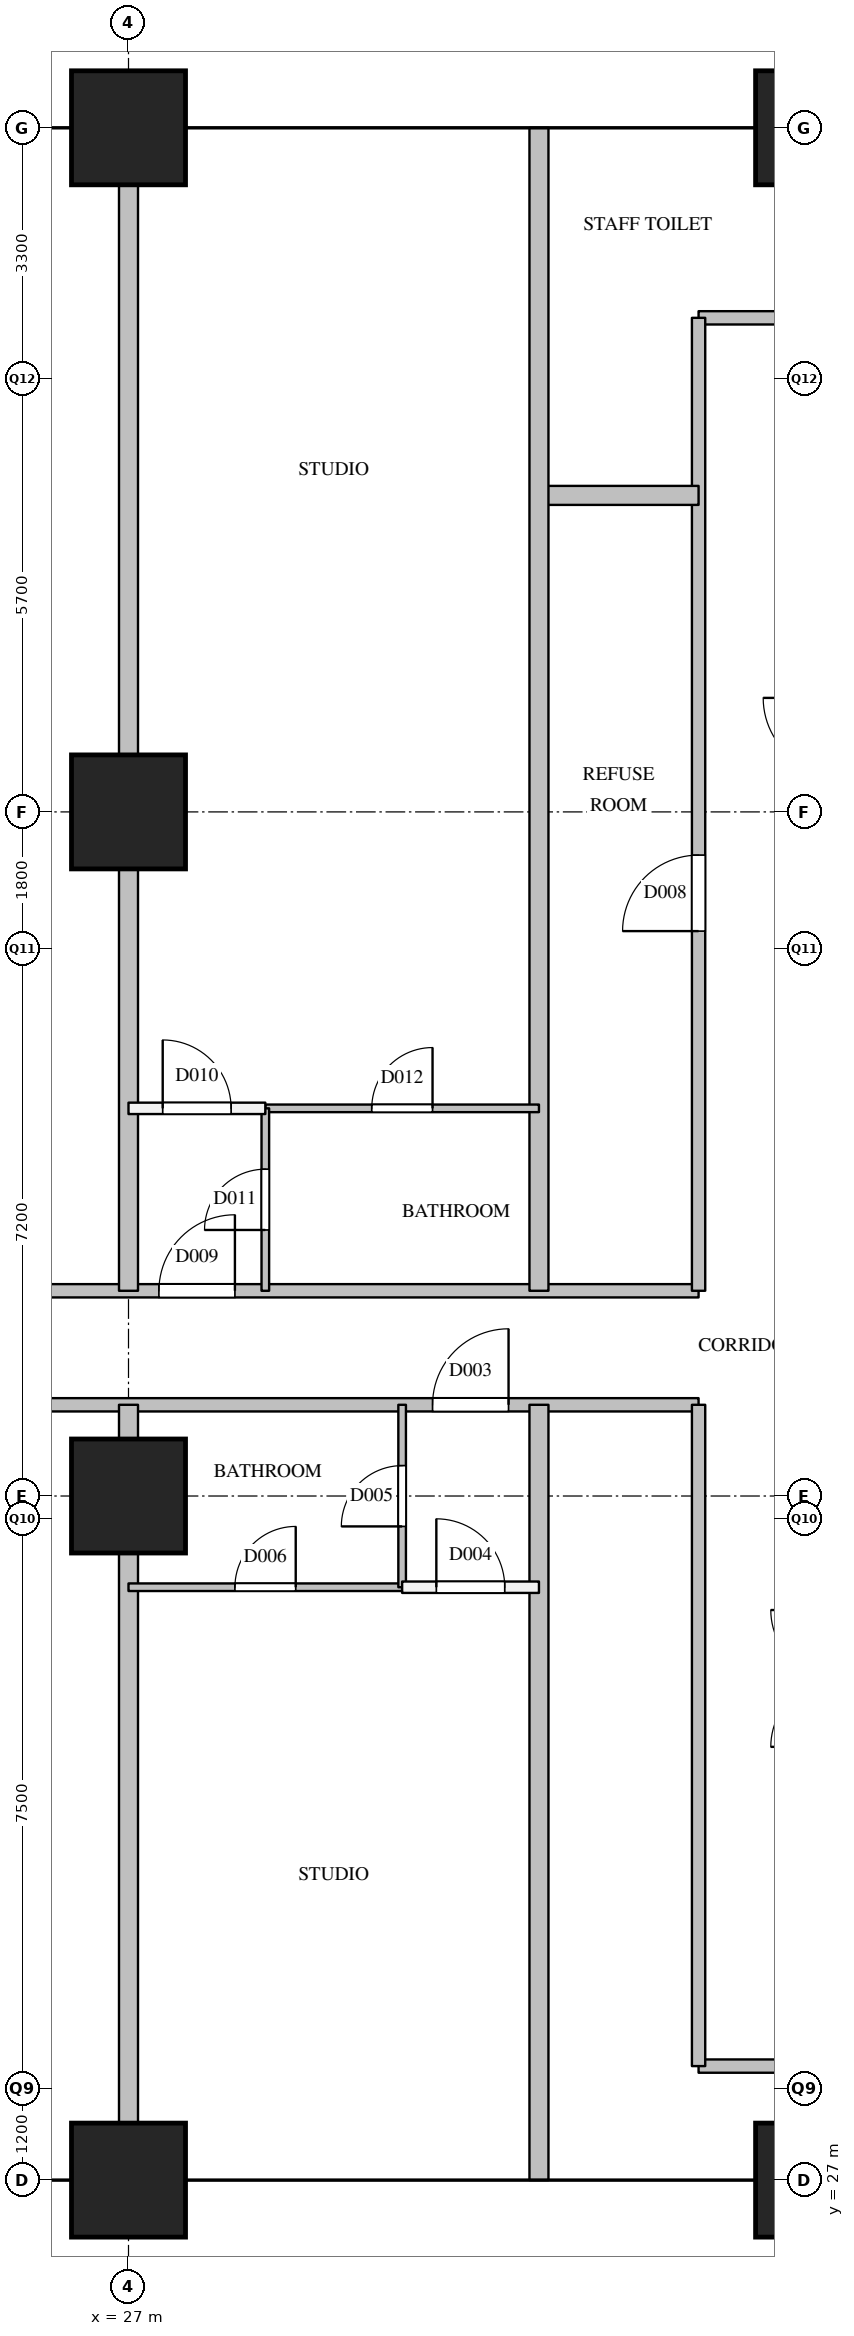
"""IFC4 building model, lengths in metres.
Left out: names, types, materials, properties, quantities, classifications, styles, units other than length and angle.
Written with IfcOpenShell. Run it as: python <this file> out.ifc"""

import sys

from ifc_helpers import new_model, si_unit, direction, frame, frame_2d, origin, origin_2d, place, context, subcontext, project, spatial, rectangle, extrude, element, fill, save


model = new_model("IFC4")
c1 = context("Model", 3, precision=1e-05, world=origin(), true_north=direction((0.0, 1.0)))
c2 = subcontext(c1, "Body", "Model", "MODEL_VIEW")
j1 = project(units=[si_unit("LENGTHUNIT", "METRE"), si_unit("PLANEANGLEUNIT", "RADIAN")], contexts=[c1])
p1 = place(None, origin())
s1 = spatial("IfcSite", under=j1, at=p1, CompositionType="ELEMENT")
p2 = place(p1, origin())
s2 = spatial("IfcBuilding", under=s1, at=p2, CompositionType="ELEMENT")
p3 = place(p2, frame((0.0, 0.0, 189.5)))
s3 = spatial("IfcBuildingStorey", under=s2, at=p3, CompositionType="ELEMENT", Elevation=189.5)
for number, where, z_axis, x_axis in (
    (1, (27.0, 27.0, 0.0), (0.0, 0.0, 1.0), (1.0, 0.0, 0.0)),
    (2, (27.0, 36.0, 0.0), (0.0, 0.0, 1.0), (1.0, 0.0, 0.0)),
    (3, (27.0, 45.0, 0.0), (0.0, 0.0, 1.0), (1.0, 0.0, 0.0)),
    (4, (27.0, 54.0, 0.0), (0.0, 0.0, 1.0), (1.0, 0.0, 0.0)),
    (5, (36.0, 27.0, 0.0), (0.0, 0.0, 1.0), (1.0, 0.0, 0.0)),
    (6, (36.0, 54.0, 0.0), (0.0, 0.0, 1.0), (1.0, 0.0, 0.0)),
):
    element("IfcColumn", number, at=place(p3, frame(where, z_axis=z_axis, x_axis=x_axis)), inside=s3, PredefinedType="COLUMN", context=c2, shape_type="SweptSolid", body=[
        extrude(rectangle(XDim=1.5, YDim=1.5, at=origin_2d()), origin(), (0.0, 0.0, 1.0), 3.9),
    ])
p4 = place(p3, frame((34.5, 28.5, 0.0), z_axis=(0.0, 0.0, 1.0), x_axis=(1.0, 0.0, 0.0)))
e7 = element("IfcWall", 7, at=p4, inside=s3, PredefinedType="PARTITIONING", context=c2, shape_type="SweptSolid", body=[
    extrude(rectangle(XDim=1.5, YDim=0.175, at=frame_2d((0.75, 0.0))), origin(), (0.0, 0.0, 1.0), 3.6),
])
p5 = place(p3, frame((19.5, 37.2, 0.0), z_axis=(0.0, 0.0, 1.0), x_axis=(1.0, 0.0, 0.0)))
e8 = element("IfcWall", 8, at=p5, inside=s3, PredefinedType="PARTITIONING", context=c2, shape_type="SweptSolid", body=[
    extrude(rectangle(XDim=15.0, YDim=0.175, at=frame_2d((7.5, 0.0))), origin(), (0.0, 0.0, 1.0), 2.6),
])
p6 = place(p5, frame((11.5, 0.0, 0.0)))
e9 = element("IfcOpeningElement", 9, at=p6, cuts=e8, PredefinedType="OPENING", context=c2, shape_type="SweptSolid", body=[
    extrude(rectangle(XDim=1.0, YDim=2.1, at=frame_2d((0.5, 1.05))), frame((0.0, 0.097, 0.0), z_axis=(0.0, -1.0, 0.0), x_axis=(1.0, 0.0, 0.0)), (0.0, 0.0, 1.0), 0.195),
])
p7 = place(p3, frame((19.5, 38.7, 0.0), z_axis=(0.0, 0.0, 1.0), x_axis=(1.0, 0.0, 0.0)))
e10 = element("IfcWall", 10, at=p7, inside=s3, PredefinedType="PARTITIONING", context=c2, shape_type="SweptSolid", body=[
    extrude(rectangle(XDim=15.0, YDim=0.175, at=frame_2d((7.5, 0.0))), origin(), (0.0, 0.0, 1.0), 2.6),
])
p8 = place(p7, frame((7.9, 0.0, 0.0)))
e11 = element("IfcOpeningElement", 11, at=p8, cuts=e10, PredefinedType="OPENING", context=c2, shape_type="SweptSolid", body=[
    extrude(rectangle(XDim=1.0, YDim=2.1, at=frame_2d((0.5, 1.05))), frame((0.0, 0.097, 0.0), z_axis=(0.0, -1.0, 0.0), x_axis=(1.0, 0.0, 0.0)), (0.0, 0.0, 1.0), 0.195),
])
p9 = place(p3, frame((34.5, 51.5, 0.0), z_axis=(0.0, 0.0, 1.0), x_axis=(1.0, 0.0, 0.0)))
e12 = element("IfcWall", 12, at=p9, inside=s3, PredefinedType="PARTITIONING", context=c2, shape_type="SweptSolid", body=[
    extrude(rectangle(XDim=15.4, YDim=0.175, at=frame_2d((7.7, 0.0))), origin(), (0.0, 0.0, 1.0), 3.6),
])
p10 = place(p9, frame((4.542, 0.0, 0.0)))
e13 = element("IfcOpeningElement", 13, at=p10, cuts=e12, PredefinedType="OPENING", context=c2, shape_type="SweptSolid", body=[
    extrude(rectangle(XDim=1.0, YDim=2.1, at=frame_2d((0.5, 1.05))), frame((0.0, 0.097, 0.0), z_axis=(0.0, -1.0, 0.0), x_axis=(1.0, 0.0, 0.0)), (0.0, 0.0, 1.0), 0.195),
])
p11 = place(p3, frame((34.5, 28.5, 0.0), z_axis=(0.0, 0.0, 1.0), x_axis=(0.0, 1.0, 0.0)))
e14 = element("IfcWall", 14, at=p11, inside=s3, PredefinedType="PARTITIONING", context=c2, shape_type="SweptSolid", body=[
    extrude(rectangle(XDim=8.7, YDim=0.175, at=frame_2d((4.35, 0.0))), origin(), (0.0, 0.0, 1.0), 3.6),
])
p12 = place(p3, frame((34.5, 38.7, 0.0), z_axis=(0.0, 0.0, 1.0), x_axis=(0.0, 1.0, 0.0)))
e15 = element("IfcWall", 15, at=p12, inside=s3, PredefinedType="PARTITIONING", context=c2, shape_type="SweptSolid", body=[
    extrude(rectangle(XDim=12.8, YDim=0.175, at=frame_2d((6.4, 0.0))), origin(), (0.0, 0.0, 1.0), 3.6),
])
p13 = place(p12, frame((4.732, 0.0, 0.0)))
e16 = element("IfcOpeningElement", 16, at=p13, cuts=e15, PredefinedType="OPENING", context=c2, shape_type="SweptSolid", body=[
    extrude(rectangle(XDim=1.0, YDim=2.1, at=frame_2d((0.5, 1.05))), frame((0.0, 0.097, 0.0), z_axis=(0.0, -1.0, 0.0), x_axis=(1.0, 0.0, 0.0)), (0.0, 0.0, 1.0), 0.195),
])
p14 = place(p3, frame((30.6, 34.8, 0.0), z_axis=(0.0, 0.0, 1.0), x_axis=(1.0, 0.0, 0.0)))
e17 = element("IfcWall", 17, at=p14, inside=s3, PredefinedType="PARTITIONING", context=c2, shape_type="SweptSolid", body=[
    extrude(rectangle(XDim=1.8, YDim=0.15, at=frame_2d((0.9, 0.0))), origin(), (0.0, 0.0, 1.0), 3.6),
])
p15 = place(p14, frame((0.45, 0.0, 0.0)))
e18 = element("IfcOpeningElement", 18, at=p15, cuts=e17, PredefinedType="OPENING", context=c2, shape_type="SweptSolid", body=[
    extrude(rectangle(XDim=0.9, YDim=2.1, at=frame_2d((0.45, 1.05))), frame((0.0, 0.085, 0.0), z_axis=(0.0, -1.0, 0.0), x_axis=(1.0, 0.0, 0.0)), (0.0, 0.0, 1.0), 0.17),
])
p16 = place(p3, frame((27.0, 41.1, 0.0), z_axis=(0.0, 0.0, 1.0), x_axis=(1.0, 0.0, 0.0)))
e19 = element("IfcWall", 19, at=p16, inside=s3, PredefinedType="PARTITIONING", context=c2, shape_type="SweptSolid", body=[
    extrude(rectangle(XDim=1.8, YDim=0.15, at=frame_2d((0.9, 0.0))), origin(), (0.0, 0.0, 1.0), 2.6),
])
p17 = place(p16, frame((0.45, 0.0, 0.0)))
e20 = element("IfcOpeningElement", 20, at=p17, cuts=e19, PredefinedType="OPENING", context=c2, shape_type="SweptSolid", body=[
    extrude(rectangle(XDim=0.9, YDim=2.1, at=frame_2d((0.45, 1.05))), frame((0.0, 0.085, 0.0), z_axis=(0.0, -1.0, 0.0), x_axis=(1.0, 0.0, 0.0)), (0.0, 0.0, 1.0), 0.17),
])
p18 = place(p3, frame((32.4, 49.164, 0.0), z_axis=(0.0, 0.0, 1.0), x_axis=(1.0, 0.0, 0.0)))
e21 = element("IfcWall", 21, at=p18, inside=s3, PredefinedType="PARTITIONING", context=c2, shape_type="SweptSolid", body=[
    extrude(rectangle(XDim=2.1, YDim=0.25, at=frame_2d((1.05, 0.0))), origin(), (0.0, 0.0, 1.0), 3.6),
])
p19 = place(p3, frame((27.0, 27.0, 0.0), z_axis=(0.0, 0.0, 1.0), x_axis=(0.0, 1.0, 0.0)))
e22 = element("IfcWall", 22, at=p19, inside=s3, PredefinedType="PARTITIONING", context=c2, shape_type="SweptSolid", body=[
    extrude(rectangle(XDim=10.2, YDim=0.25, at=frame_2d((5.1, 0.0))), origin(), (0.0, 0.0, 1.0), 2.6),
])
p20 = place(p3, frame((27.0, 38.7, 0.0), z_axis=(0.0, 0.0, 1.0), x_axis=(0.0, 1.0, 0.0)))
e23 = element("IfcWall", 23, at=p20, inside=s3, PredefinedType="PARTITIONING", context=c2, shape_type="SweptSolid", body=[
    extrude(rectangle(XDim=15.3, YDim=0.25, at=frame_2d((7.65, 0.0))), origin(), (0.0, 0.0, 1.0), 2.6),
])
p21 = place(p3, frame((32.4, 27.0, 0.0), z_axis=(0.0, 0.0, 1.0), x_axis=(0.0, 1.0, 0.0)))
e24 = element("IfcWall", 24, at=p21, inside=s3, PredefinedType="PARTITIONING", context=c2, shape_type="SweptSolid", body=[
    extrude(rectangle(XDim=10.2, YDim=0.25, at=frame_2d((5.1, 0.0))), origin(), (0.0, 0.0, 1.0), 2.6),
])
p22 = place(p3, frame((32.4, 38.7, 0.0), z_axis=(0.0, 0.0, 1.0), x_axis=(0.0, 1.0, 0.0)))
e25 = element("IfcWall", 25, at=p22, inside=s3, PredefinedType="PARTITIONING", context=c2, shape_type="SweptSolid", body=[
    extrude(rectangle(XDim=15.3, YDim=0.25, at=frame_2d((7.65, 0.0))), origin(), (0.0, 0.0, 1.0), 2.6),
])
p23 = place(p3, frame((27.0, 34.8, 0.0), z_axis=(0.0, 0.0, 1.0), x_axis=(1.0, 0.0, 0.0)))
e26 = element("IfcWall", 26, at=p23, inside=s3, PredefinedType="PARTITIONING", context=c2, shape_type="SweptSolid", body=[
    extrude(rectangle(XDim=3.6, YDim=0.1, at=frame_2d((1.8, 0.0))), origin(), (0.0, 0.0, 1.0), 2.6),
])
p24 = place(p23, frame((1.4, 0.0, 0.0)))
e27 = element("IfcOpeningElement", 27, at=p24, cuts=e26, PredefinedType="OPENING", context=c2, shape_type="SweptSolid", body=[
    extrude(rectangle(XDim=0.8, YDim=2.1, at=frame_2d((0.4, 1.05))), frame((0.0, 0.06, 0.0), z_axis=(0.0, -1.0, 0.0), x_axis=(1.0, 0.0, 0.0)), (0.0, 0.0, 1.0), 0.12),
])
p25 = place(p3, frame((28.8, 41.1, 0.0), z_axis=(0.0, 0.0, 1.0), x_axis=(1.0, 0.0, 0.0)))
e28 = element("IfcWall", 28, at=p25, inside=s3, PredefinedType="PARTITIONING", context=c2, shape_type="SweptSolid", body=[
    extrude(rectangle(XDim=3.6, YDim=0.1, at=frame_2d((1.8, 0.0))), origin(), (0.0, 0.0, 1.0), 3.6),
])
p26 = place(p25, frame((1.4, 0.0, 0.0)))
e29 = element("IfcOpeningElement", 29, at=p26, cuts=e28, PredefinedType="OPENING", context=c2, shape_type="SweptSolid", body=[
    extrude(rectangle(XDim=0.8, YDim=2.1, at=frame_2d((0.4, 1.05))), frame((0.0, 0.06, 0.0), z_axis=(0.0, -1.0, 0.0), x_axis=(1.0, 0.0, 0.0)), (0.0, 0.0, 1.0), 0.12),
])
p27 = place(p3, frame((28.8, 38.7, 0.0), z_axis=(0.0, 0.0, 1.0), x_axis=(0.0, 1.0, 0.0)))
e30 = element("IfcWall", 30, at=p27, inside=s3, PredefinedType="PARTITIONING", context=c2, shape_type="SweptSolid", body=[
    extrude(rectangle(XDim=2.4, YDim=0.1, at=frame_2d((1.2, 0.0))), origin(), (0.0, 0.0, 1.0), 3.6),
])
p28 = place(p27, frame((0.8, 0.0, 0.0)))
e31 = element("IfcOpeningElement", 31, at=p28, cuts=e30, PredefinedType="OPENING", context=c2, shape_type="SweptSolid", body=[
    extrude(rectangle(XDim=0.8, YDim=2.1, at=frame_2d((0.4, 1.05))), frame((0.0, 0.06, 0.0), z_axis=(0.0, -1.0, 0.0), x_axis=(1.0, 0.0, 0.0)), (0.0, 0.0, 1.0), 0.12),
])
p29 = place(p3, frame((30.6, 34.8, 0.0), z_axis=(0.0, 0.0, 1.0), x_axis=(0.0, 1.0, 0.0)))
e32 = element("IfcWall", 32, at=p29, inside=s3, PredefinedType="PARTITIONING", context=c2, shape_type="SweptSolid", body=[
    extrude(rectangle(XDim=2.4, YDim=0.1, at=frame_2d((1.2, 0.0))), origin(), (0.0, 0.0, 1.0), 3.6),
])
p30 = place(p29, frame((0.8, 0.0, 0.0)))
e33 = element("IfcOpeningElement", 33, at=p30, cuts=e32, PredefinedType="OPENING", context=c2, shape_type="SweptSolid", body=[
    extrude(rectangle(XDim=0.8, YDim=2.1, at=frame_2d((0.4, 1.05))), frame((0.0, 0.06, 0.0), z_axis=(0.0, -1.0, 0.0), x_axis=(1.0, 0.0, 0.0)), (0.0, 0.0, 1.0), 0.12),
])
p31 = place(p6, origin())
e34 = element("IfcDoor", 34, at=p31, inside=s3, OperationType="SINGLE_SWING_RIGHT", PredefinedType="DOOR", context=c2, shape_type="SweptSolid", body=[
    extrude(rectangle(XDim=1.0, YDim=2.1, at=frame_2d((0.5, 1.05))), frame((0.0, 0.025, 0.0), z_axis=(0.0, -1.0, 0.0), x_axis=(1.0, 0.0, 0.0)), (0.0, 0.0, 1.0), 0.05),
])
fill(e9, e34)
p32 = place(p15, origin())
e35 = element("IfcDoor", 35, at=p32, inside=s3, OperationType="SINGLE_SWING_LEFT", PredefinedType="DOOR", context=c2, shape_type="SweptSolid", body=[
    extrude(rectangle(XDim=0.9, YDim=2.1, at=frame_2d((0.45, 1.05))), frame((0.0, 0.025, 0.0), z_axis=(0.0, -1.0, 0.0), x_axis=(1.0, 0.0, 0.0)), (0.0, 0.0, 1.0), 0.05),
])
fill(e18, e35)
p33 = place(p30, origin())
e36 = element("IfcDoor", 36, at=p33, inside=s3, OperationType="SINGLE_SWING_LEFT", PredefinedType="DOOR", context=c2, shape_type="SweptSolid", body=[
    extrude(rectangle(XDim=0.8, YDim=2.1, at=frame_2d((0.4, 1.05))), frame((0.0, 0.025, 0.0), z_axis=(0.0, -1.0, 0.0), x_axis=(1.0, 0.0, 0.0)), (0.0, 0.0, 1.0), 0.05),
])
fill(e33, e36)
p34 = place(p24, origin())
e37 = element("IfcDoor", 37, at=p34, inside=s3, OperationType="SINGLE_SWING_RIGHT", PredefinedType="DOOR", context=c2, shape_type="SweptSolid", body=[
    extrude(rectangle(XDim=0.8, YDim=2.1, at=frame_2d((0.4, 1.05))), frame((0.0, 0.025, 0.0), z_axis=(0.0, -1.0, 0.0), x_axis=(1.0, 0.0, 0.0)), (0.0, 0.0, 1.0), 0.05),
])
fill(e27, e37)
p35 = place(p13, origin())
e38 = element("IfcDoor", 38, at=p35, inside=s3, OperationType="SINGLE_SWING_LEFT", PredefinedType="DOOR", context=c2, shape_type="SweptSolid", body=[
    extrude(rectangle(XDim=1.0, YDim=2.1, at=frame_2d((0.5, 1.05))), frame((0.0, 0.025, 0.0), z_axis=(0.0, -1.0, 0.0), x_axis=(1.0, 0.0, 0.0)), (0.0, 0.0, 1.0), 0.05),
])
fill(e16, e38)
p36 = place(p8, origin())
e39 = element("IfcDoor", 39, at=p36, inside=s3, OperationType="SINGLE_SWING_RIGHT", PredefinedType="DOOR", context=c2, shape_type="SweptSolid", body=[
    extrude(rectangle(XDim=1.0, YDim=2.1, at=frame_2d((0.5, 1.05))), frame((0.0, 0.025, 0.0), z_axis=(0.0, -1.0, 0.0), x_axis=(1.0, 0.0, 0.0)), (0.0, 0.0, 1.0), 0.05),
])
fill(e11, e39)
p37 = place(p17, origin())
e40 = element("IfcDoor", 40, at=p37, inside=s3, OperationType="SINGLE_SWING_LEFT", PredefinedType="DOOR", context=c2, shape_type="SweptSolid", body=[
    extrude(rectangle(XDim=0.9, YDim=2.1, at=frame_2d((0.45, 1.05))), frame((0.0, 0.025, 0.0), z_axis=(0.0, -1.0, 0.0), x_axis=(1.0, 0.0, 0.0)), (0.0, 0.0, 1.0), 0.05),
])
fill(e20, e40)
p38 = place(p28, origin())
e41 = element("IfcDoor", 41, at=p38, inside=s3, OperationType="SINGLE_SWING_LEFT", PredefinedType="DOOR", context=c2, shape_type="SweptSolid", body=[
    extrude(rectangle(XDim=0.8, YDim=2.1, at=frame_2d((0.4, 1.05))), frame((0.0, 0.025, 0.0), z_axis=(0.0, -1.0, 0.0), x_axis=(1.0, 0.0, 0.0)), (0.0, 0.0, 1.0), 0.05),
])
fill(e31, e41)
p39 = place(p26, origin())
e42 = element("IfcDoor", 42, at=p39, inside=s3, OperationType="SINGLE_SWING_RIGHT", PredefinedType="DOOR", context=c2, shape_type="SweptSolid", body=[
    extrude(rectangle(XDim=0.8, YDim=2.1, at=frame_2d((0.4, 1.05))), frame((0.0, 0.025, 0.0), z_axis=(0.0, -1.0, 0.0), x_axis=(1.0, 0.0, 0.0)), (0.0, 0.0, 1.0), 0.05),
])
fill(e29, e42)
save(model, sys.argv[1])
